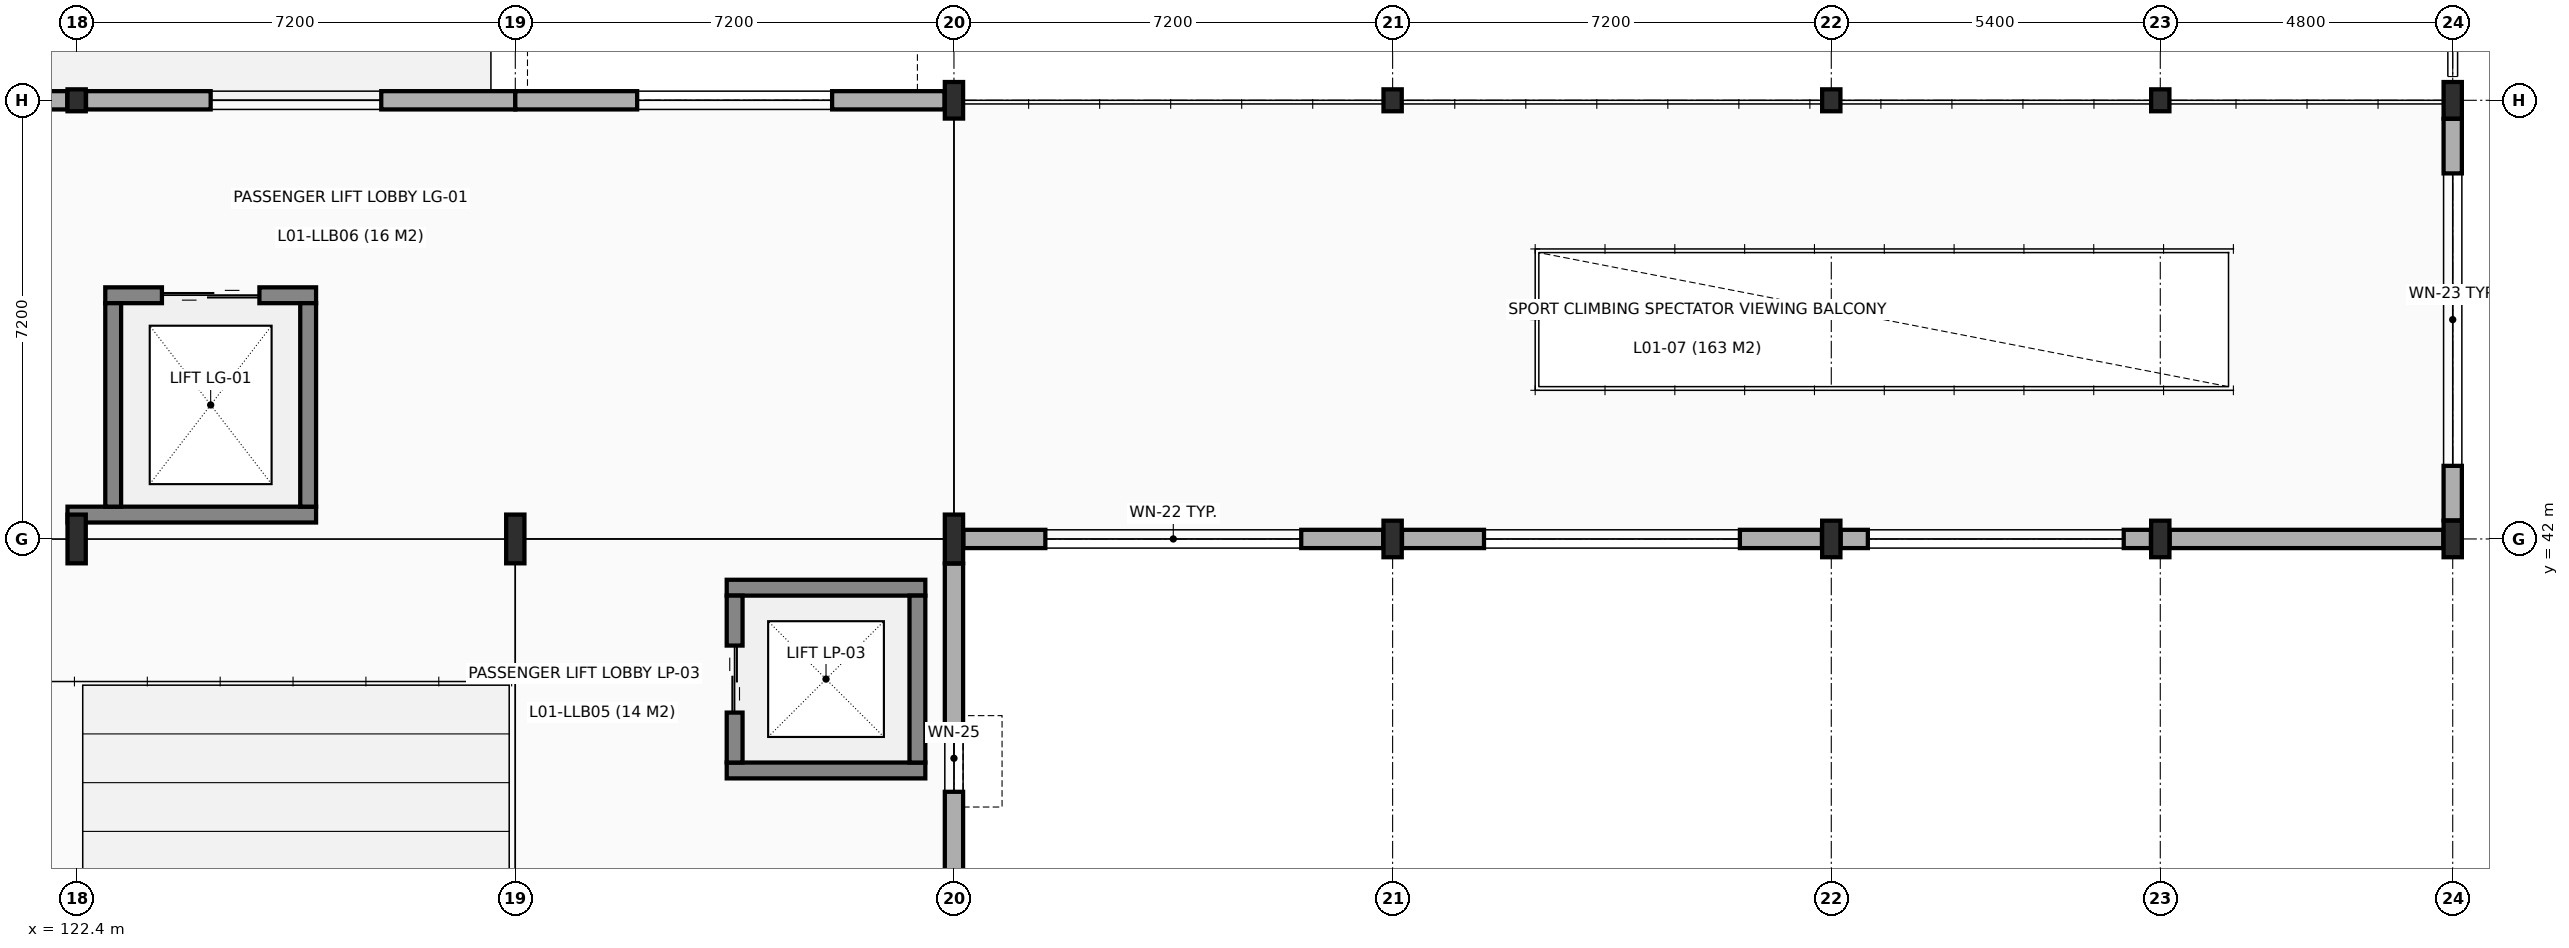
"""IFC4 building model, lengths in metres.
Left out: names, types, materials, properties, quantities, classifications, styles, units other than length and angle.
Written with IfcOpenShell. Run it as: python <this file> out.ifc"""

import sys

from ifc_helpers import new_model, si_unit, direction, frame, frame_2d, origin, origin_2d, place, context, subcontext, project, spatial, rectangle, i_section, extrude, element, fill, save


model = new_model("IFC4")
c1 = context("Model", 3, precision=1e-05, world=origin(), true_north=direction((0.0, 1.0)))
c2 = subcontext(c1, "Body", "Model", "MODEL_VIEW")
j1 = project(units=[si_unit("LENGTHUNIT", "METRE"), si_unit("PLANEANGLEUNIT", "RADIAN")], contexts=[c1])
p1 = place(None, origin())
s1 = spatial("IfcSite", under=j1, at=p1, CompositionType="ELEMENT")
p2 = place(p1, origin())
s2 = spatial("IfcBuilding", under=s1, at=p2, CompositionType="ELEMENT")
p3 = place(p2, frame((0.0, 0.0, 4.8)))
s3 = spatial("IfcBuildingStorey", under=s2, at=p3, CompositionType="ELEMENT", Elevation=4.8)
p4 = place(p3, frame((122.4, 42.0, 0.0), z_axis=(0.0, 0.0, 1.0), x_axis=(1.0, 0.0, 0.0)))
e1 = element("IfcColumn", 1, at=p4, inside=s3, PredefinedType="COLUMN", context=c2, shape_type="SweptSolid", body=[
    extrude(i_section(OverallWidth=0.3, OverallDepth=0.8, WebThickness=0.018, FlangeThickness=0.033, at=origin_2d()), origin(), (0.0, 0.0, 1.0), 4.8),
])
p5 = place(p3, frame((122.4, 49.2, 0.0), z_axis=(0.0, 0.0, 1.0), x_axis=(1.0, 0.0, 0.0)))
e2 = element("IfcColumn", 2, at=p5, inside=s3, PredefinedType="COLUMN", context=c2, shape_type="SweptSolid", body=[
    extrude(i_section(OverallWidth=0.3, OverallDepth=0.36, WebThickness=0.012, FlangeThickness=0.022, at=origin_2d()), origin(), (0.0, 0.0, 1.0), 4.8),
])
for number, where, z_axis, x_axis in (
    (3, (129.6, 42.0, 0.0), (0.0, 0.0, 1.0), (1.0, 0.0, 0.0)),
    (4, (136.8, 42.0, 0.0), (0.0, 0.0, 1.0), (1.0, 0.0, 0.0)),
):
    element("IfcColumn", number, at=place(p3, frame(where, z_axis=z_axis, x_axis=x_axis)), inside=s3, PredefinedType="COLUMN", context=c2, shape_type="SweptSolid", body=[
        extrude(i_section(OverallWidth=0.3, OverallDepth=0.8, WebThickness=0.018, FlangeThickness=0.033, at=origin_2d()), origin(), (0.0, 0.0, 1.0), 4.8),
    ])
for number, where, z_axis, x_axis in (
    (5, (136.8, 49.2, 0.0), (0.0, 0.0, 1.0), (1.0, 0.0, 0.0)),
    (6, (144.0, 42.0, 0.0), (0.0, 0.0, 1.0), (1.0, 0.0, 0.0)),
):
    element("IfcColumn", number, at=place(p3, frame(where, z_axis=z_axis, x_axis=x_axis)), inside=s3, PredefinedType="COLUMN", context=c2, shape_type="SweptSolid", body=[
        extrude(i_section(OverallWidth=0.3, OverallDepth=0.6, WebThickness=0.015, FlangeThickness=0.03, at=origin_2d()), origin(), (0.0, 0.0, 1.0), 4.8),
    ])
p6 = place(p3, frame((144.0, 49.2, 0.0), z_axis=(0.0, 0.0, 1.0), x_axis=(1.0, 0.0, 0.0)))
e7 = element("IfcColumn", 7, at=p6, inside=s3, PredefinedType="COLUMN", context=c2, shape_type="SweptSolid", body=[
    extrude(i_section(OverallWidth=0.3, OverallDepth=0.36, WebThickness=0.012, FlangeThickness=0.022, at=origin_2d()), origin(), (0.0, 0.0, 1.0), 4.8),
])
p7 = place(p3, frame((151.2, 42.0, 0.0), z_axis=(0.0, 0.0, 1.0), x_axis=(1.0, 0.0, 0.0)))
e8 = element("IfcColumn", 8, at=p7, inside=s3, PredefinedType="COLUMN", context=c2, shape_type="SweptSolid", body=[
    extrude(i_section(OverallWidth=0.3, OverallDepth=0.6, WebThickness=0.015, FlangeThickness=0.03, at=origin_2d()), origin(), (0.0, 0.0, 1.0), 4.8),
])
p8 = place(p3, frame((151.2, 49.2, 0.0), z_axis=(0.0, 0.0, 1.0), x_axis=(1.0, 0.0, 0.0)))
e9 = element("IfcColumn", 9, at=p8, inside=s3, PredefinedType="COLUMN", context=c2, shape_type="SweptSolid", body=[
    extrude(i_section(OverallWidth=0.3, OverallDepth=0.36, WebThickness=0.012, FlangeThickness=0.022, at=origin_2d()), origin(), (0.0, 0.0, 1.0), 4.8),
])
p9 = place(p3, frame((156.6, 42.0, 0.0), z_axis=(0.0, 0.0, 1.0), x_axis=(1.0, 0.0, 0.0)))
e10 = element("IfcColumn", 10, at=p9, inside=s3, PredefinedType="COLUMN", context=c2, shape_type="SweptSolid", body=[
    extrude(i_section(OverallWidth=0.3, OverallDepth=0.6, WebThickness=0.015, FlangeThickness=0.03, at=origin_2d()), origin(), (0.0, 0.0, 1.0), 4.8),
])
p10 = place(p3, frame((156.6, 49.2, 0.0), z_axis=(0.0, 0.0, 1.0), x_axis=(1.0, 0.0, 0.0)))
e11 = element("IfcColumn", 11, at=p10, inside=s3, PredefinedType="COLUMN", context=c2, shape_type="SweptSolid", body=[
    extrude(i_section(OverallWidth=0.3, OverallDepth=0.36, WebThickness=0.012, FlangeThickness=0.022, at=origin_2d()), origin(), (0.0, 0.0, 1.0), 4.8),
])
for number, where, z_axis, x_axis in (
    (12, (161.4, 42.0, 0.0), (0.0, 0.0, 1.0), (1.0, 0.0, 0.0)),
    (13, (161.4, 49.2, 0.0), (0.0, 0.0, 1.0), (1.0, 0.0, 0.0)),
):
    element("IfcColumn", number, at=place(p3, frame(where, z_axis=z_axis, x_axis=x_axis)), inside=s3, PredefinedType="COLUMN", context=c2, shape_type="SweptSolid", body=[
        extrude(i_section(OverallWidth=0.3, OverallDepth=0.6, WebThickness=0.015, FlangeThickness=0.03, at=origin_2d()), origin(), (0.0, 0.0, 1.0), 4.8),
    ])
p11 = place(p3, frame((136.8, 35.104, 0.0), z_axis=(0.0, 0.0, 1.0), x_axis=(0.0, 1.0, 0.0)))
e14 = element("IfcWall", 14, at=p11, inside=s3, PredefinedType="SOLIDWALL", context=c2, shape_type="SweptSolid", body=[
    extrude(rectangle(XDim=6.492, YDim=0.3, at=frame_2d((3.246, 0.0))), origin(), (0.0, 0.0, 1.0), 4.045),
])
p12 = place(p11, frame((2.746, 0.0, 1.0)))
e15 = element("IfcOpeningElement", 15, at=p12, cuts=e14, PredefinedType="OPENING", context=c2, shape_type="SweptSolid", body=[
    extrude(rectangle(XDim=1.1, YDim=1.6, at=frame_2d((0.55, 0.8))), frame((0.0, 0.16, 0.0), z_axis=(0.0, -1.0, 0.0), x_axis=(1.0, 0.0, 0.0)), (0.0, 0.0, 1.0), 0.32),
])
p13 = place(p3, frame((115.354, 49.2, 0.0), z_axis=(0.0, 0.0, 1.0), x_axis=(1.0, 0.0, 0.0)))
e16 = element("IfcWall", 16, at=p13, inside=s3, PredefinedType="SOLIDWALL", context=c2, shape_type="SweptSolid", body=[
    extrude(rectangle(XDim=6.892, YDim=0.3, at=frame_2d((3.446, 0.0))), origin(), (0.0, 0.0, 1.0), 3.995),
])
p14 = place(p13, frame((2.246, 0.0, 1.0)))
e17 = element("IfcOpeningElement", 17, at=p14, cuts=e16, PredefinedType="OPENING", context=c2, shape_type="SweptSolid", body=[
    extrude(rectangle(XDim=2.4, YDim=2.1, at=frame_2d((1.2, 1.05))), frame((0.0, 0.16, 0.0), z_axis=(0.0, -1.0, 0.0), x_axis=(1.0, 0.0, 0.0)), (0.0, 0.0, 1.0), 0.32),
])
p15 = place(p3, frame((122.554, 49.2, 0.0), z_axis=(0.0, 0.0, 1.0), x_axis=(1.0, 0.0, 0.0)))
e18 = element("IfcWall", 18, at=p15, inside=s3, PredefinedType="SOLIDWALL", context=c2, shape_type="SweptSolid", body=[
    extrude(rectangle(XDim=7.046, YDim=0.3, at=frame_2d((3.523, 0.0))), origin(), (0.0, 0.0, 1.0), 3.845),
])
p16 = place(p15, frame((2.046, 0.0, 1.0)))
e19 = element("IfcOpeningElement", 19, at=p16, cuts=e18, PredefinedType="OPENING", context=c2, shape_type="SweptSolid", body=[
    extrude(rectangle(XDim=2.8, YDim=2.1, at=frame_2d((1.4, 1.05))), frame((0.0, 0.16, 0.0), z_axis=(0.0, -1.0, 0.0), x_axis=(1.0, 0.0, 0.0)), (0.0, 0.0, 1.0), 0.32),
])
p17 = place(p3, frame((129.6, 49.2, 0.0), z_axis=(0.0, 0.0, 1.0), x_axis=(1.0, 0.0, 0.0)))
e20 = element("IfcWall", 20, at=p17, inside=s3, PredefinedType="SOLIDWALL", context=c2, shape_type="SweptSolid", body=[
    extrude(rectangle(XDim=7.046, YDim=0.3, at=frame_2d((3.523, 0.0))), origin(), (0.0, 0.0, 1.0), 3.845),
])
p18 = place(p17, frame((2.0, 0.0, 1.0)))
e21 = element("IfcOpeningElement", 21, at=p18, cuts=e20, PredefinedType="OPENING", context=c2, shape_type="SweptSolid", body=[
    extrude(rectangle(XDim=3.2, YDim=2.1, at=frame_2d((1.6, 1.05))), frame((0.0, 0.16, 0.0), z_axis=(0.0, -1.0, 0.0), x_axis=(1.0, 0.0, 0.0)), (0.0, 0.0, 1.0), 0.32),
])
p19 = place(p3, frame((136.954, 42.0, 0.0), z_axis=(0.0, 0.0, 1.0), x_axis=(1.0, 0.0, 0.0)))
e22 = element("IfcWall", 22, at=p19, inside=s3, PredefinedType="SOLIDWALL", context=c2, shape_type="SweptSolid", body=[
    extrude(rectangle(XDim=6.892, YDim=0.3, at=frame_2d((3.446, 0.0))), origin(), (0.0, 0.0, 1.0), 4.145),
])
p20 = place(p19, frame((1.346, 0.0, 1.0)))
e23 = element("IfcOpeningElement", 23, at=p20, cuts=e22, PredefinedType="OPENING", context=c2, shape_type="SweptSolid", body=[
    extrude(rectangle(XDim=4.2, YDim=1.4, at=frame_2d((2.1, 0.7))), frame((0.0, 0.16, 0.0), z_axis=(0.0, -1.0, 0.0), x_axis=(1.0, 0.0, 0.0)), (0.0, 0.0, 1.0), 0.32),
])
p21 = place(p3, frame((144.154, 42.0, 0.0), z_axis=(0.0, 0.0, 1.0), x_axis=(1.0, 0.0, 0.0)))
e24 = element("IfcWall", 24, at=p21, inside=s3, PredefinedType="SOLIDWALL", context=c2, shape_type="SweptSolid", body=[
    extrude(rectangle(XDim=6.892, YDim=0.3, at=frame_2d((3.446, 0.0))), origin(), (0.0, 0.0, 1.0), 4.145),
])
p22 = place(p21, frame((1.346, 0.0, 1.0)))
e25 = element("IfcOpeningElement", 25, at=p22, cuts=e24, PredefinedType="OPENING", context=c2, shape_type="SweptSolid", body=[
    extrude(rectangle(XDim=4.2, YDim=1.4, at=frame_2d((2.1, 0.7))), frame((0.0, 0.16, 0.0), z_axis=(0.0, -1.0, 0.0), x_axis=(1.0, 0.0, 0.0)), (0.0, 0.0, 1.0), 0.32),
])
p23 = place(p3, frame((151.354, 42.0, 0.0), z_axis=(0.0, 0.0, 1.0), x_axis=(1.0, 0.0, 0.0)))
e26 = element("IfcWall", 26, at=p23, inside=s3, PredefinedType="SOLIDWALL", context=c2, shape_type="SweptSolid", body=[
    extrude(rectangle(XDim=5.092, YDim=0.3, at=frame_2d((2.546, 0.0))), origin(), (0.0, 0.0, 1.0), 4.145),
])
p24 = place(p23, frame((0.446, 0.0, 1.0)))
e27 = element("IfcOpeningElement", 27, at=p24, cuts=e26, PredefinedType="OPENING", context=c2, shape_type="SweptSolid", body=[
    extrude(rectangle(XDim=4.2, YDim=1.4, at=frame_2d((2.1, 0.7))), frame((0.0, 0.16, 0.0), z_axis=(0.0, -1.0, 0.0), x_axis=(1.0, 0.0, 0.0)), (0.0, 0.0, 1.0), 0.32),
])
p25 = place(p3, frame((156.754, 42.0, 0.0), z_axis=(0.0, 0.0, 1.0), x_axis=(1.0, 0.0, 0.0)))
e28 = element("IfcWall", 28, at=p25, inside=s3, PredefinedType="SOLIDWALL", context=c2, shape_type="SweptSolid", body=[
    extrude(rectangle(XDim=4.492, YDim=0.3, at=frame_2d((2.246, 0.0))), origin(), (0.0, 0.0, 1.0), 4.145),
])
p26 = place(p3, frame((161.4, 42.304, 0.0), z_axis=(0.0, 0.0, 1.0), x_axis=(0.0, 1.0, 0.0)))
e29 = element("IfcWall", 29, at=p26, inside=s3, PredefinedType="SOLIDWALL", context=c2, shape_type="SweptSolid", body=[
    extrude(rectangle(XDim=6.592, YDim=0.3, at=frame_2d((3.296, 0.0))), origin(), (0.0, 0.0, 1.0), 4.045),
])
p27 = place(p26, frame((0.896, 0.0, 1.0)))
e30 = element("IfcOpeningElement", 30, at=p27, cuts=e29, PredefinedType="OPENING", context=c2, shape_type="SweptSolid", body=[
    extrude(rectangle(XDim=4.8, YDim=1.5, at=frame_2d((2.4, 0.75))), frame((0.0, 0.16, 0.0), z_axis=(0.0, -1.0, 0.0), x_axis=(1.0, 0.0, 0.0)), (0.0, 0.0, 1.0), 0.32),
])
for number, where, z_axis, x_axis in (
    (31, (133.07, 38.2, 0.0), (0.0, 0.0, 1.0), (1.0, 0.0, 0.0)),
    (32, (133.07, 41.2, 0.0), (0.0, 0.0, 1.0), (1.0, 0.0, 0.0)),
):
    element("IfcWall", number, at=place(p3, frame(where, z_axis=z_axis, x_axis=x_axis)), inside=s3, PredefinedType="SHEAR", context=c2, shape_type="SweptSolid", body=[
        extrude(rectangle(XDim=3.26, YDim=0.26, at=frame_2d((1.63, 0.0))), origin(), (0.0, 0.0, 1.0), 4.56),
    ])
p28 = place(p3, frame((133.2, 38.33, 0.0), z_axis=(0.0, 0.0, 1.0), x_axis=(0.0, 1.0, 0.0)))
e33 = element("IfcWall", 33, at=p28, inside=s3, PredefinedType="SHEAR", context=c2, shape_type="SweptSolid", body=[
    extrude(rectangle(XDim=2.74, YDim=0.26, at=frame_2d((1.37, 0.0))), origin(), (0.0, 0.0, 1.0), 4.56),
])
p29 = place(p28, frame((0.82, 0.0, 0.0)))
e34 = element("IfcOpeningElement", 34, at=p29, cuts=e33, PredefinedType="OPENING", context=c2, shape_type="SweptSolid", body=[
    extrude(rectangle(XDim=1.1, YDim=2.15, at=frame_2d((0.55, 1.075))), frame((0.0, 0.14, 0.0), z_axis=(0.0, -1.0, 0.0), x_axis=(1.0, 0.0, 0.0)), (0.0, 0.0, 1.0), 0.28),
])
p30 = place(p3, frame((136.2, 38.33, 0.0), z_axis=(0.0, 0.0, 1.0), x_axis=(0.0, 1.0, 0.0)))
e35 = element("IfcWall", 35, at=p30, inside=s3, PredefinedType="SHEAR", context=c2, shape_type="SweptSolid", body=[
    extrude(rectangle(XDim=2.74, YDim=0.26, at=frame_2d((1.37, 0.0))), origin(), (0.0, 0.0, 1.0), 4.56),
])
p31 = place(p3, frame((122.25, 42.4, 0.0), z_axis=(0.0, 0.0, 1.0), x_axis=(1.0, 0.0, 0.0)))
e36 = element("IfcWall", 36, at=p31, inside=s3, PredefinedType="SHEAR", context=c2, shape_type="SweptSolid", body=[
    extrude(rectangle(XDim=4.08, YDim=0.26, at=frame_2d((2.04, 0.0))), origin(), (0.0, 0.0, 1.0), 4.56),
])
p32 = place(p3, frame((122.87, 46.0, 0.0), z_axis=(0.0, 0.0, 1.0), x_axis=(1.0, 0.0, 0.0)))
e37 = element("IfcWall", 37, at=p32, inside=s3, PredefinedType="SHEAR", context=c2, shape_type="SweptSolid", body=[
    extrude(rectangle(XDim=3.46, YDim=0.26, at=frame_2d((1.73, 0.0))), origin(), (0.0, 0.0, 1.0), 4.56),
])
p33 = place(p32, frame((0.93, 0.0, 0.0)))
e38 = element("IfcOpeningElement", 38, at=p33, cuts=e37, PredefinedType="OPENING", context=c2, shape_type="SweptSolid", body=[
    extrude(rectangle(XDim=1.6, YDim=2.3, at=frame_2d((0.8, 1.15))), frame((0.0, 0.14, 0.0), z_axis=(0.0, -1.0, 0.0), x_axis=(1.0, 0.0, 0.0)), (0.0, 0.0, 1.0), 0.28),
])
for number, where, z_axis, x_axis in (
    (39, (123.0, 42.53, 0.0), (0.0, 0.0, 1.0), (0.0, 1.0, 0.0)),
    (40, (126.2, 42.53, 0.0), (0.0, 0.0, 1.0), (0.0, 1.0, 0.0)),
):
    element("IfcWall", number, at=place(p3, frame(where, z_axis=z_axis, x_axis=x_axis)), inside=s3, PredefinedType="SHEAR", context=c2, shape_type="SweptSolid", body=[
        extrude(rectangle(XDim=3.34, YDim=0.26, at=frame_2d((1.67, 0.0))), origin(), (0.0, 0.0, 1.0), 4.56),
    ])
p34 = place(p12, origin())
e41 = element("IfcWindow", 41, at=p34, inside=s3, PartitioningType="SINGLE_PANEL", PredefinedType="WINDOW", context=c2, shape_type="SweptSolid", body=[
    extrude(rectangle(XDim=1.1, YDim=1.6, at=frame_2d((0.55, 0.8))), frame((0.0, 0.03, 0.0), z_axis=(0.0, -1.0, 0.0), x_axis=(1.0, 0.0, 0.0)), (0.0, 0.0, 1.0), 0.06),
])
fill(e15, e41)
p35 = place(p16, origin())
e42 = element("IfcWindow", 42, at=p35, inside=s3, PartitioningType="SINGLE_PANEL", PredefinedType="WINDOW", context=c2, shape_type="SweptSolid", body=[
    extrude(rectangle(XDim=2.8, YDim=2.1, at=frame_2d((1.4, 1.05))), frame((0.0, 0.03, 0.0), z_axis=(0.0, -1.0, 0.0), x_axis=(1.0, 0.0, 0.0)), (0.0, 0.0, 1.0), 0.06),
])
fill(e19, e42)
p36 = place(p18, origin())
e43 = element("IfcWindow", 43, at=p36, inside=s3, PartitioningType="SINGLE_PANEL", PredefinedType="WINDOW", context=c2, shape_type="SweptSolid", body=[
    extrude(rectangle(XDim=3.2, YDim=2.1, at=frame_2d((1.6, 1.05))), frame((0.0, 0.03, 0.0), z_axis=(0.0, -1.0, 0.0), x_axis=(1.0, 0.0, 0.0)), (0.0, 0.0, 1.0), 0.06),
])
fill(e21, e43)
p37 = place(p20, origin())
e44 = element("IfcWindow", 44, at=p37, inside=s3, PartitioningType="SINGLE_PANEL", PredefinedType="WINDOW", context=c2, shape_type="SweptSolid", body=[
    extrude(rectangle(XDim=4.2, YDim=1.4, at=frame_2d((2.1, 0.7))), frame((0.0, 0.03, 0.0), z_axis=(0.0, -1.0, 0.0), x_axis=(1.0, 0.0, 0.0)), (0.0, 0.0, 1.0), 0.06),
])
fill(e23, e44)
p38 = place(p22, origin())
e45 = element("IfcWindow", 45, at=p38, inside=s3, PartitioningType="SINGLE_PANEL", PredefinedType="WINDOW", context=c2, shape_type="SweptSolid", body=[
    extrude(rectangle(XDim=4.2, YDim=1.4, at=frame_2d((2.1, 0.7))), frame((0.0, 0.03, 0.0), z_axis=(0.0, -1.0, 0.0), x_axis=(1.0, 0.0, 0.0)), (0.0, 0.0, 1.0), 0.06),
])
fill(e25, e45)
p39 = place(p24, origin())
e46 = element("IfcWindow", 46, at=p39, inside=s3, PartitioningType="SINGLE_PANEL", PredefinedType="WINDOW", context=c2, shape_type="SweptSolid", body=[
    extrude(rectangle(XDim=4.2, YDim=1.4, at=frame_2d((2.1, 0.7))), frame((0.0, 0.03, 0.0), z_axis=(0.0, -1.0, 0.0), x_axis=(1.0, 0.0, 0.0)), (0.0, 0.0, 1.0), 0.06),
])
fill(e27, e46)
p40 = place(p27, origin())
e47 = element("IfcWindow", 47, at=p40, inside=s3, PartitioningType="SINGLE_PANEL", PredefinedType="WINDOW", context=c2, shape_type="SweptSolid", body=[
    extrude(rectangle(XDim=4.8, YDim=1.5, at=frame_2d((2.4, 0.75))), frame((0.0, 0.03, 0.0), z_axis=(0.0, -1.0, 0.0), x_axis=(1.0, 0.0, 0.0)), (0.0, 0.0, 1.0), 0.06),
])
fill(e30, e47)
p41 = place(p29, origin())
e48 = element("IfcDoor", 48, at=p41, inside=s3, OperationType="DOUBLE_DOOR_SLIDING", PredefinedType="DOOR", context=c2, shape_type="SweptSolid", body=[
    extrude(rectangle(XDim=1.1, YDim=2.15, at=frame_2d((0.55, 1.075))), frame((0.0, 0.025, 0.0), z_axis=(0.0, -1.0, 0.0), x_axis=(1.0, 0.0, 0.0)), (0.0, 0.0, 1.0), 0.05),
])
fill(e34, e48)
p42 = place(p33, origin())
e49 = element("IfcDoor", 49, at=p42, inside=s3, OperationType="DOUBLE_DOOR_SLIDING", PredefinedType="DOOR", context=c2, shape_type="SweptSolid", body=[
    extrude(rectangle(XDim=1.6, YDim=2.3, at=frame_2d((0.8, 1.15))), frame((0.0, 0.025, 0.0), z_axis=(0.0, -1.0, 0.0), x_axis=(1.0, 0.0, 0.0)), (0.0, 0.0, 1.0), 0.05),
])
fill(e38, e49)
save(model, sys.argv[1])
